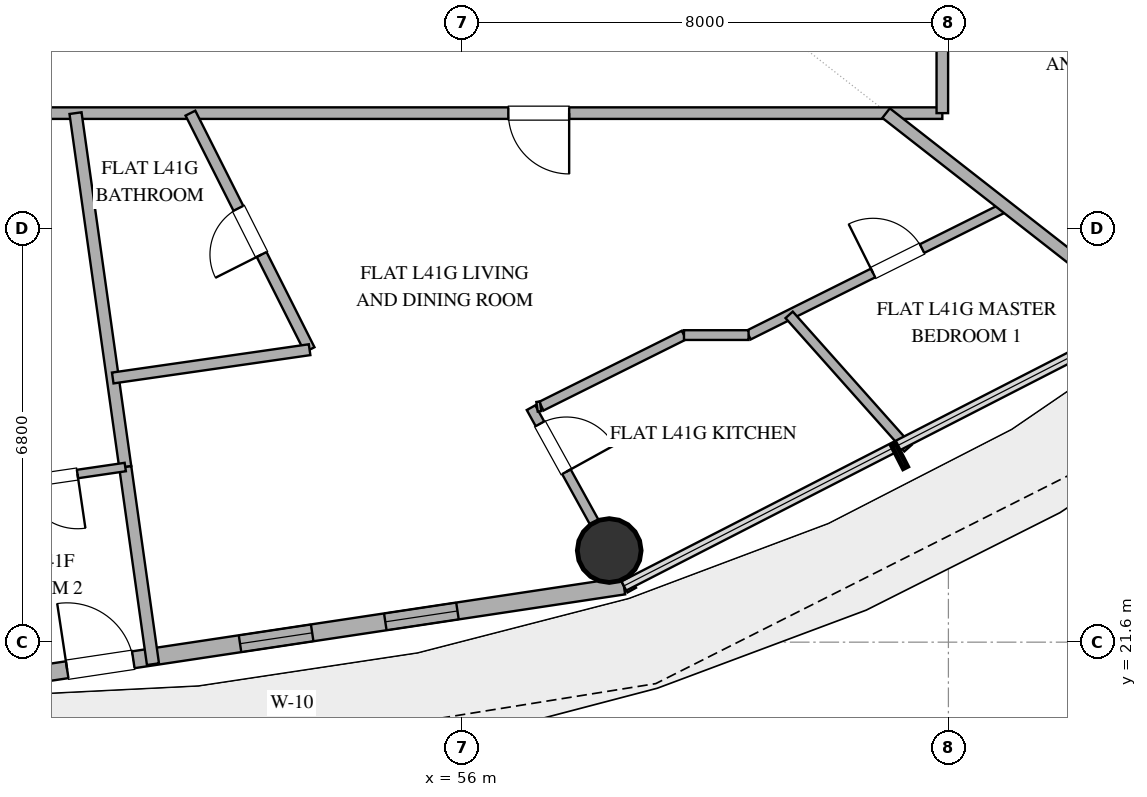
"""IFC4 building model, lengths in metres.
Left out: names, types, materials, properties, quantities, classifications, styles, units other than length and angle.
Written with IfcOpenShell. Run it as: python <this file> out.ifc"""

import sys

from ifc_helpers import new_model, si_unit, direction, frame, frame_2d, origin, origin_2d, place, context, subcontext, project, spatial, rectangle, hollow_circle, extrude, element, fill, save


model = new_model("IFC4")
c1 = context("Model", 3, precision=1e-05, world=origin(), true_north=direction((0.0, 1.0)))
c2 = subcontext(c1, "Body", "Model", "MODEL_VIEW")
j1 = project(units=[si_unit("LENGTHUNIT", "METRE"), si_unit("PLANEANGLEUNIT", "RADIAN")], contexts=[c1])
p1 = place(None, origin())
s1 = spatial("IfcSite", under=j1, at=p1, CompositionType="ELEMENT")
p2 = place(p1, origin())
s2 = spatial("IfcBuilding", under=s1, at=p2, CompositionType="ELEMENT")
p3 = place(p2, frame((0.0, 0.0, 165.0)))
s3 = spatial("IfcBuildingStorey", under=s2, at=p3, CompositionType="ELEMENT", Elevation=165.0)
p4 = place(p3, frame((58.422, 23.107, 0.0), z_axis=(0.0, 0.0, 1.0), x_axis=(1.0, 0.0, 0.0)))
e1 = element("IfcColumn", 1, at=p4, inside=s3, PredefinedType="COLUMN", context=c2, shape_type="SweptSolid", body=[
    extrude(hollow_circle(Radius=0.525, WallThickness=0.028, at=origin_2d()), origin(), (0.0, 0.0, 1.0), 3.38),
])
p5 = place(p3, frame((48.0, 20.92, 0.0), z_axis=(0.0, 0.0, 1.0), x_axis=(0.988863993413, 0.148822049884, 0.0)))
e2 = element("IfcWall", 2, at=p5, inside=s3, PredefinedType="SOLIDWALL", context=c2, shape_type="SweptSolid", body=[
    extrude(rectangle(XDim=10.783, YDim=0.28, at=frame_2d((5.392, 0.0))), origin(), (0.0, 0.0, 1.0), 3.38),
])
p6 = place(p5, frame((1.524, 0.0, 0.0)))
e3 = element("IfcOpeningElement", 3, at=p6, cuts=e2, PredefinedType="OPENING", context=c2, shape_type="SweptSolid", body=[
    extrude(rectangle(XDim=1.1, YDim=2.25, at=frame_2d((0.55, 1.125))), frame((0.0, 0.15, 0.0), z_axis=(0.0, -1.0, 0.0), x_axis=(1.0, 0.0, 0.0)), (0.0, 0.0, 1.0), 0.3),
])
p7 = place(p5, frame((4.399, 0.0, 0.85)))
e4 = element("IfcOpeningElement", 4, at=p7, cuts=e2, PredefinedType="OPENING", context=c2, shape_type="SweptSolid", body=[
    extrude(rectangle(XDim=1.2, YDim=1.6, at=frame_2d((0.6, 0.8))), frame((0.0, 0.15, 0.0), z_axis=(0.0, -1.0, 0.0), x_axis=(1.0, 0.0, 0.0)), (0.0, 0.0, 1.0), 0.3),
])
p8 = place(p5, frame((6.815, 0.0, 0.85)))
e5 = element("IfcOpeningElement", 5, at=p8, cuts=e2, PredefinedType="OPENING", context=c2, shape_type="SweptSolid", body=[
    extrude(rectangle(XDim=1.2, YDim=1.6, at=frame_2d((0.6, 0.8))), frame((0.0, 0.15, 0.0), z_axis=(0.0, -1.0, 0.0), x_axis=(1.0, 0.0, 0.0)), (0.0, 0.0, 1.0), 0.3),
])
p9 = place(p3, frame((63.9, 30.3, 0.0), z_axis=(0.0, 0.0, 1.0), x_axis=(-1.0, 0.0, 0.0)))
e6 = element("IfcWall", 6, at=p9, inside=s3, PredefinedType="PARTITIONING", context=c2, shape_type="SweptSolid", body=[
    extrude(rectangle(XDim=15.625, YDim=0.19, at=frame_2d((7.813, 0.0))), origin(), (0.0, 0.0, 1.0), 2.74),
])
p10 = place(p9, frame((6.137, 0.0, 0.0)))
e7 = element("IfcOpeningElement", 7, at=p10, cuts=e6, PredefinedType="OPENING", context=c2, shape_type="SweptSolid", body=[
    extrude(rectangle(XDim=1.0, YDim=2.2, at=frame_2d((0.5, 1.1))), frame((0.0, 0.105, 0.0), z_axis=(0.0, -1.0, 0.0), x_axis=(1.0, 0.0, 0.0)), (0.0, 0.0, 1.0), 0.21),
])
p11 = place(p3, frame((63.9, 40.49, 0.0), z_axis=(0.0, 0.0, 1.0), x_axis=(0.0, -1.0, 0.0)))
e8 = element("IfcWall", 8, at=p11, inside=s3, PredefinedType="PARTITIONING", context=c2, shape_type="SweptSolid", body=[
    extrude(rectangle(XDim=10.19, YDim=0.19, at=frame_2d((5.095, 0.0))), origin(), (0.0, 0.0, 1.0), 2.74),
])
p12 = place(p11, frame((5.659, 0.0, 0.0)))
e9 = element("IfcOpeningElement", 9, at=p12, cuts=e8, PredefinedType="OPENING", context=c2, shape_type="SweptSolid", body=[
    extrude(rectangle(XDim=1.0, YDim=2.2, at=frame_2d((0.5, 1.1))), frame((0.0, 0.105, 0.0), z_axis=(0.0, -1.0, 0.0), x_axis=(1.0, 0.0, 0.0)), (0.0, 0.0, 1.0), 0.21),
])
p13 = place(p3, frame((49.644, 30.3, 0.0), z_axis=(0.0, 0.0, 1.0), x_axis=(0.139158723068, -0.990270089316, 0.0)))
e10 = element("IfcWall", 10, at=p13, inside=s3, PredefinedType="PARTITIONING", context=c2, shape_type="SweptSolid", body=[
    extrude(rectangle(XDim=5.877, YDim=0.2, at=frame_2d((2.938, 0.0))), origin(), (0.0, 0.0, 1.0), 2.74),
])
p14 = place(p3, frame((53.494, 26.41, 0.0), z_axis=(0.0, 0.0, 1.0), x_axis=(-0.449879384809, 0.89308932315, 0.0)))
e11 = element("IfcWall", 11, at=p14, inside=s3, PredefinedType="PLUMBINGWALL", context=c2, shape_type="SweptSolid", body=[
    extrude(rectangle(XDim=4.356, YDim=0.18, at=frame_2d((2.178, 0.0))), origin(), (0.0, 0.0, 1.0), 2.74),
])
p15 = place(p14, frame((1.753, 0.0, 0.0)))
e12 = element("IfcOpeningElement", 12, at=p15, cuts=e11, PredefinedType="OPENING", context=c2, shape_type="SweptSolid", body=[
    extrude(rectangle(XDim=0.85, YDim=2.1, at=frame_2d((0.425, 1.05))), frame((0.0, 0.1, 0.0), z_axis=(0.0, -1.0, 0.0), x_axis=(1.0, 0.0, 0.0)), (0.0, 0.0, 1.0), 0.2),
])
p16 = place(p3, frame((60.713, 26.65, 0.0), z_axis=(0.0, 0.0, 1.0), x_axis=(0.894932492822, 0.446201561283, 0.0)))
e13 = element("IfcWall", 13, at=p16, inside=s3, PredefinedType="PLUMBINGWALL", context=c2, shape_type="SweptSolid", body=[
    extrude(rectangle(XDim=4.729, YDim=0.16, at=frame_2d((2.365, 0.0))), origin(), (0.0, 0.0, 1.0), 2.74),
])
p17 = place(p16, frame((2.288, 0.0, 0.0)))
e14 = element("IfcOpeningElement", 14, at=p17, cuts=e13, PredefinedType="OPENING", context=c2, shape_type="SweptSolid", body=[
    extrude(rectangle(XDim=0.9, YDim=2.1, at=frame_2d((0.45, 1.05))), frame((0.0, 0.09, 0.0), z_axis=(0.0, -1.0, 0.0), x_axis=(1.0, 0.0, 0.0)), (0.0, 0.0, 1.0), 0.18),
])
p18 = place(p3, frame((57.135, 25.456, 0.0), z_axis=(0.0, 0.0, 1.0), x_axis=(0.483427589536, -0.875384353113, 0.0)))
e15 = element("IfcWall", 15, at=p18, inside=s3, PredefinedType="PLUMBINGWALL", context=c2, shape_type="SweptSolid", body=[
    extrude(rectangle(XDim=3.427, YDim=0.16, at=frame_2d((1.713, 0.0))), origin(), (0.0, 0.0, 1.0), 2.74),
])
p19 = place(p18, frame((0.303, 0.0, 0.0)))
e16 = element("IfcOpeningElement", 16, at=p19, cuts=e15, PredefinedType="OPENING", context=c2, shape_type="SweptSolid", body=[
    extrude(rectangle(XDim=0.9, YDim=2.1, at=frame_2d((0.45, 1.05))), frame((0.0, 0.09, 0.0), z_axis=(0.0, -1.0, 0.0), x_axis=(1.0, 0.0, 0.0)), (0.0, 0.0, 1.0), 0.18),
])
p20 = place(p3, frame((50.462, 24.48, 0.0), z_axis=(0.0, 0.0, 1.0), x_axis=(0.139145146576, -0.990271997072, 0.0)))
e17 = element("IfcWall", 17, at=p20, inside=s3, PredefinedType="PARTITIONING", context=c2, shape_type="SweptSolid", body=[
    extrude(rectangle(XDim=3.274, YDim=0.2, at=frame_2d((1.637, 0.0))), origin(), (0.0, 0.0, 1.0), 2.74),
])
p21 = place(p3, frame((50.257, 25.944, 0.0), z_axis=(0.0, 0.0, 1.0), x_axis=(0.989826700743, 0.142278257286, 0.0)))
e18 = element("IfcWall", 18, at=p21, inside=s3, PredefinedType="PLUMBINGWALL", context=c2, shape_type="SweptSolid", body=[
    extrude(rectangle(XDim=3.271, YDim=0.18, at=frame_2d((1.635, 0.0))), origin(), (0.0, 0.0, 1.0), 2.74),
])
p22 = place(p3, frame((67.37, 26.866, 0.0), z_axis=(0.0, 0.0, 1.0), x_axis=(-0.788004464355, 0.615669525117, 0.0)))
e19 = element("IfcWall", 19, at=p22, inside=s3, PredefinedType="PARTITIONING", context=c2, shape_type="SweptSolid", body=[
    extrude(rectangle(XDim=5.577, YDim=0.2, at=frame_2d((2.789, 0.0))), origin(), (0.0, 0.0, 1.0), 2.74),
])
p23 = place(p3, frame((63.335, 24.79, 0.0), z_axis=(0.0, 0.0, 1.0), x_axis=(-0.665255741341, 0.746615562799, 0.0)))
e20 = element("IfcWall", 20, at=p23, inside=s3, PredefinedType="PLUMBINGWALL", context=c2, shape_type="SweptSolid", body=[
    extrude(rectangle(XDim=2.938, YDim=0.16, at=frame_2d((1.469, 0.0))), origin(), (0.0, 0.0, 1.0), 2.74),
])
p24 = place(p3, frame((59.651, 26.65, 0.0), z_axis=(0.0, 0.0, 1.0), x_axis=(-0.895041110332, -0.445983644112, 0.0)))
e21 = element("IfcWall", 21, at=p24, inside=s3, PredefinedType="PLUMBINGWALL", context=c2, shape_type="SweptSolid", body=[
    extrude(rectangle(XDim=2.621, YDim=0.16, at=frame_2d((1.311, 0.0))), origin(), (0.0, 0.0, 1.0), 2.74),
])
p25 = place(p3, frame((50.462, 24.48, 0.0), z_axis=(0.0, 0.0, 1.0), x_axis=(-0.989489157172, -0.144607080872, 0.0)))
e22 = element("IfcWall", 22, at=p25, inside=s3, PredefinedType="PARTITIONING", context=c2, shape_type="SweptSolid", body=[
    extrude(rectangle(XDim=2.489, YDim=0.14, at=frame_2d((1.244, 0.0))), origin(), (0.0, 0.0, 1.0), 2.74),
])
p26 = place(p25, frame((0.794, 0.0, 0.0)))
e23 = element("IfcOpeningElement", 23, at=p26, cuts=e22, PredefinedType="OPENING", context=c2, shape_type="SweptSolid", body=[
    extrude(rectangle(XDim=0.9, YDim=2.1, at=frame_2d((0.45, 1.05))), frame((0.0, 0.08, 0.0), z_axis=(0.0, -1.0, 0.0), x_axis=(1.0, 0.0, 0.0)), (0.0, 0.0, 1.0), 0.16),
])
p27 = place(p3, frame((60.713, 26.65, 0.0), z_axis=(0.0, 0.0, 1.0), x_axis=(-1.0, 0.0, 0.0)))
e24 = element("IfcWall", 24, at=p27, inside=s3, PredefinedType="PLUMBINGWALL", context=c2, shape_type="SweptSolid", body=[
    extrude(rectangle(XDim=1.062, YDim=0.16, at=frame_2d((0.531, 0.0))), origin(), (0.0, 0.0, 1.0), 2.74),
])
p28 = place(p3, frame((57.293, 25.479, 0.0), z_axis=(0.0, 0.0, 1.0), x_axis=(-0.989532981063, -0.144306893072, 0.0)))
e25 = element("IfcWall", 25, at=p28, inside=s3, PredefinedType="PLUMBINGWALL", context=c2, shape_type="SweptSolid", body=[
    extrude(rectangle(XDim=0.059, YDim=0.16, at=frame_2d((0.03, 0.0))), origin(), (0.0, 0.0, 1.0), 2.74),
])
p29 = place(p6, origin())
e26 = element("IfcDoor", 26, at=p29, inside=s3, OperationType="SINGLE_SWING_LEFT", PredefinedType="DOOR", context=c2, shape_type="SweptSolid", body=[
    extrude(rectangle(XDim=1.1, YDim=2.25, at=frame_2d((0.55, 1.125))), frame((0.0, 0.025, 0.0), z_axis=(0.0, -1.0, 0.0), x_axis=(1.0, 0.0, 0.0)), (0.0, 0.0, 1.0), 0.05),
])
fill(e3, e26)
p30 = place(p7, origin())
e27 = element("IfcWindow", 27, at=p30, inside=s3, PartitioningType="SINGLE_PANEL", PredefinedType="WINDOW", context=c2, shape_type="SweptSolid", body=[
    extrude(rectangle(XDim=1.2, YDim=1.6, at=frame_2d((0.6, 0.8))), frame((0.0, 0.03, 0.0), z_axis=(0.0, -1.0, 0.0), x_axis=(1.0, 0.0, 0.0)), (0.0, 0.0, 1.0), 0.06),
])
fill(e4, e27)
p31 = place(p8, origin())
e28 = element("IfcWindow", 28, at=p31, inside=s3, PartitioningType="SINGLE_PANEL", PredefinedType="WINDOW", context=c2, shape_type="SweptSolid", body=[
    extrude(rectangle(XDim=1.2, YDim=1.6, at=frame_2d((0.6, 0.8))), frame((0.0, 0.03, 0.0), z_axis=(0.0, -1.0, 0.0), x_axis=(1.0, 0.0, 0.0)), (0.0, 0.0, 1.0), 0.06),
])
fill(e5, e28)
p32 = place(p10, origin())
e29 = element("IfcDoor", 29, at=p32, inside=s3, OperationType="SINGLE_SWING_LEFT", PredefinedType="DOOR", context=c2, shape_type="SweptSolid", body=[
    extrude(rectangle(XDim=1.0, YDim=2.2, at=frame_2d((0.5, 1.1))), frame((0.0, 0.025, 0.0), z_axis=(0.0, -1.0, 0.0), x_axis=(1.0, 0.0, 0.0)), (0.0, 0.0, 1.0), 0.05),
])
fill(e7, e29)
p33 = place(p15, origin())
e30 = element("IfcDoor", 30, at=p33, inside=s3, OperationType="SINGLE_SWING_LEFT", PredefinedType="DOOR", context=c2, shape_type="SweptSolid", body=[
    extrude(rectangle(XDim=0.85, YDim=2.1, at=frame_2d((0.425, 1.05))), frame((0.0, 0.025, 0.0), z_axis=(0.0, -1.0, 0.0), x_axis=(1.0, 0.0, 0.0)), (0.0, 0.0, 1.0), 0.05),
])
fill(e12, e30)
p34 = place(p17, origin())
e31 = element("IfcDoor", 31, at=p34, inside=s3, OperationType="SINGLE_SWING_LEFT", PredefinedType="DOOR", context=c2, shape_type="SweptSolid", body=[
    extrude(rectangle(XDim=0.9, YDim=2.1, at=frame_2d((0.45, 1.05))), frame((0.0, 0.025, 0.0), z_axis=(0.0, -1.0, 0.0), x_axis=(1.0, 0.0, 0.0)), (0.0, 0.0, 1.0), 0.05),
])
fill(e14, e31)
p35 = place(p19, origin())
e32 = element("IfcDoor", 32, at=p35, inside=s3, OperationType="SINGLE_SWING_RIGHT", PredefinedType="DOOR", context=c2, shape_type="SweptSolid", body=[
    extrude(rectangle(XDim=0.9, YDim=2.1, at=frame_2d((0.45, 1.05))), frame((0.0, 0.025, 0.0), z_axis=(0.0, -1.0, 0.0), x_axis=(1.0, 0.0, 0.0)), (0.0, 0.0, 1.0), 0.05),
])
fill(e16, e32)
p36 = place(p26, origin())
e33 = element("IfcDoor", 33, at=p36, inside=s3, OperationType="SINGLE_SWING_LEFT", PredefinedType="DOOR", context=c2, shape_type="SweptSolid", body=[
    extrude(rectangle(XDim=0.9, YDim=2.1, at=frame_2d((0.45, 1.05))), frame((0.0, 0.025, 0.0), z_axis=(0.0, -1.0, 0.0), x_axis=(1.0, 0.0, 0.0)), (0.0, 0.0, 1.0), 0.05),
])
fill(e23, e33)
save(model, sys.argv[1])
